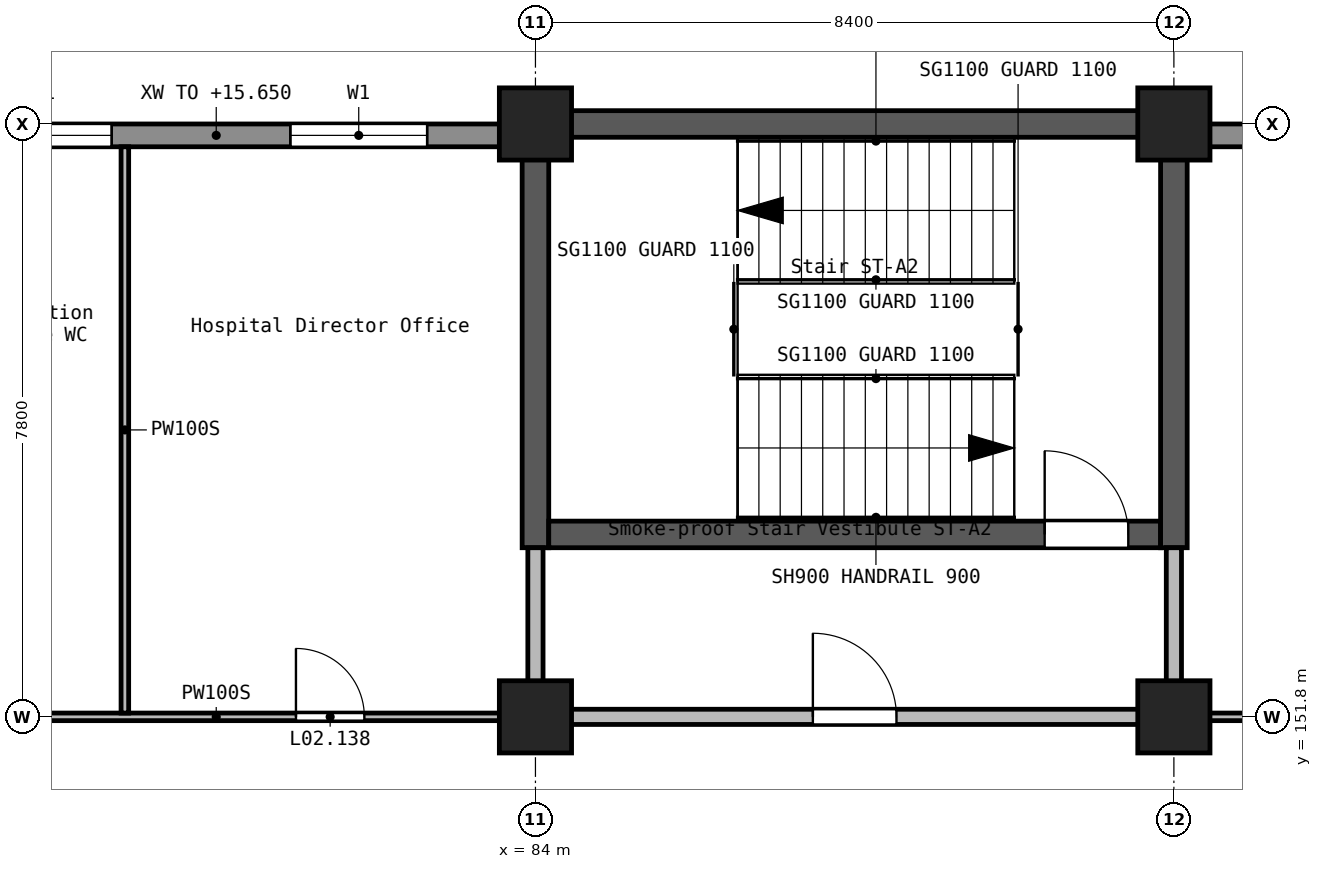
"""IFC4 building model, lengths in metres.
Left out: names, types, materials, properties, quantities, classifications, styles, units other than length and angle.
Written with IfcOpenShell. Run it as: python <this file> out.ifc"""

import sys

from ifc_helpers import new_model, si_unit, direction, frame, frame_2d, origin, origin_2d, place, context, subcontext, project, spatial, rectangle, extrude, element, fill, save


model = new_model("IFC4")
c1 = context("Model", 3, precision=1e-05, world=origin(), true_north=direction((0.0, 1.0)))
c2 = subcontext(c1, "Body", "Model", "MODEL_VIEW")
j1 = project(units=[si_unit("LENGTHUNIT", "METRE"), si_unit("PLANEANGLEUNIT", "RADIAN")], contexts=[c1])
p1 = place(None, origin())
s1 = spatial("IfcSite", under=j1, at=p1, CompositionType="ELEMENT")
p2 = place(p1, origin())
s2 = spatial("IfcBuilding", under=s1, at=p2, CompositionType="ELEMENT")
p3 = place(p2, frame((0.0, 0.0, 12.6)))
s3 = spatial("IfcBuildingStorey", under=s2, at=p3, CompositionType="ELEMENT", Elevation=12.6)
for number, where, z_axis, x_axis in (
    (1, (84.0, 151.8, 0.0), (0.0, 0.0, 1.0), (1.0, 0.0, 0.0)),
    (2, (84.0, 159.6, 0.0), (0.0, 0.0, 1.0), (1.0, 0.0, 0.0)),
    (3, (92.4, 151.8, 0.0), (0.0, 0.0, 1.0), (1.0, 0.0, 0.0)),
    (4, (92.4, 159.6, 0.0), (0.0, 0.0, 1.0), (1.0, 0.0, 0.0)),
):
    element("IfcColumn", number, at=place(p3, frame(where, z_axis=z_axis, x_axis=x_axis)), inside=s3, PredefinedType="COLUMN", context=c2, shape_type="SweptSolid", body=[
        extrude(rectangle(XDim=0.95, YDim=0.95, at=origin_2d()), origin(), (0.0, 0.0, 1.0), 4.2),
    ])
p4 = place(p3, frame((83.825, 159.6, 0.0), z_axis=(0.0, 0.0, 1.0), x_axis=(1.0, 0.0, 0.0)))
e5 = element("IfcWall", 5, at=p4, inside=s3, PredefinedType="SHEAR", context=c2, shape_type="SweptSolid", body=[
    extrude(rectangle(XDim=8.4, YDim=0.35, at=frame_2d((4.2, 0.0))), origin(), (0.0, 0.0, 1.0), 4.2),
])
p5 = place(p3, frame((84.0, 154.025, 0.0), z_axis=(0.0, 0.0, 1.0), x_axis=(0.0, 1.0, 0.0)))
e6 = element("IfcWall", 6, at=p5, inside=s3, PredefinedType="SHEAR", context=c2, shape_type="SweptSolid", body=[
    extrude(rectangle(XDim=5.4, YDim=0.35, at=frame_2d((2.7, 0.0))), origin(), (0.0, 0.0, 1.0), 4.2),
])
p6 = place(p3, frame((84.175, 154.2, 0.0), z_axis=(0.0, 0.0, 1.0), x_axis=(1.0, 0.0, 0.0)))
e7 = element("IfcWall", 7, at=p6, inside=s3, PredefinedType="SHEAR", context=c2, shape_type="SweptSolid", body=[
    extrude(rectangle(XDim=8.05, YDim=0.35, at=frame_2d((4.025, 0.0))), origin(), (0.0, 0.0, 1.0), 4.2),
])
p7 = place(p6, frame((6.525, 0.0, 0.0)))
e8 = element("IfcOpeningElement", 8, at=p7, cuts=e7, PredefinedType="OPENING", context=c2, shape_type="SweptSolid", body=[
    extrude(rectangle(XDim=1.1, YDim=2.1, at=frame_2d((0.55, 1.05))), frame((0.0, 0.185, 0.0), z_axis=(0.0, -1.0, 0.0), x_axis=(1.0, 0.0, 0.0)), (0.0, 0.0, 1.0), 0.37),
])
p8 = place(p3, frame((92.4, 154.025, 0.0), z_axis=(0.0, 0.0, 1.0), x_axis=(0.0, 1.0, 0.0)))
e9 = element("IfcWall", 9, at=p8, inside=s3, PredefinedType="SHEAR", context=c2, shape_type="SweptSolid", body=[
    extrude(rectangle(XDim=5.75, YDim=0.35, at=frame_2d((2.875, 0.0))), origin(), (0.0, 0.0, 1.0), 4.2),
])
p9 = place(p3, frame((100.35, 159.45, 0.0), z_axis=(0.0, 0.0, 1.0), x_axis=(-1.0, 0.0, 0.0)))
e10 = element("IfcWall", 10, at=p9, inside=s3, PredefinedType="STANDARD", context=c2, shape_type="SweptSolid", body=[
    extrude(rectangle(XDim=7.5, YDim=0.3, at=frame_2d((3.75, 0.0))), origin(), (0.0, 0.0, 1.0), 3.05),
])
p10 = place(p9, frame((0.575, 0.0, 0.9)))
e11 = element("IfcOpeningElement", 11, at=p10, cuts=e10, PredefinedType="OPENING", context=c2, shape_type="SweptSolid", body=[
    extrude(rectangle(XDim=1.8, YDim=1.5, at=frame_2d((0.9, 0.75))), frame((0.0, 0.16, 0.0), z_axis=(0.0, -1.0, 0.0), x_axis=(1.0, 0.0, 0.0)), (0.0, 0.0, 1.0), 0.32),
])
p11 = place(p9, frame((4.725, 0.0, 0.9)))
e12 = element("IfcOpeningElement", 12, at=p11, cuts=e10, PredefinedType="OPENING", context=c2, shape_type="SweptSolid", body=[
    extrude(rectangle(XDim=1.8, YDim=1.5, at=frame_2d((0.9, 0.75))), frame((0.0, 0.16, 0.0), z_axis=(0.0, -1.0, 0.0), x_axis=(1.0, 0.0, 0.0)), (0.0, 0.0, 1.0), 0.32),
])
p12 = place(p3, frame((83.55, 159.45, 0.0), z_axis=(0.0, 0.0, 1.0), x_axis=(-1.0, 0.0, 0.0)))
e13 = element("IfcWall", 13, at=p12, inside=s3, PredefinedType="STANDARD", context=c2, shape_type="SweptSolid", body=[
    extrude(rectangle(XDim=7.5, YDim=0.3, at=frame_2d((3.75, 0.0))), origin(), (0.0, 0.0, 1.0), 3.05),
])
p13 = place(p12, frame((0.975, 0.0, 0.9)))
e14 = element("IfcOpeningElement", 14, at=p13, cuts=e13, PredefinedType="OPENING", context=c2, shape_type="SweptSolid", body=[
    extrude(rectangle(XDim=1.8, YDim=1.5, at=frame_2d((0.9, 0.75))), frame((0.0, 0.16, 0.0), z_axis=(0.0, -1.0, 0.0), x_axis=(1.0, 0.0, 0.0)), (0.0, 0.0, 1.0), 0.32),
])
p14 = place(p12, frame((5.125, 0.0, 0.9)))
e15 = element("IfcOpeningElement", 15, at=p14, cuts=e13, PredefinedType="OPENING", context=c2, shape_type="SweptSolid", body=[
    extrude(rectangle(XDim=1.8, YDim=1.5, at=frame_2d((0.9, 0.75))), frame((0.0, 0.16, 0.0), z_axis=(0.0, -1.0, 0.0), x_axis=(1.0, 0.0, 0.0)), (0.0, 0.0, 1.0), 0.32),
])
p15 = place(p3, frame((84.45, 151.8, 0.0), z_axis=(0.0, 0.0, 1.0), x_axis=(1.0, 0.0, 0.0)))
e16 = element("IfcWall", 16, at=p15, inside=s3, PredefinedType="SOLIDWALL", context=c2, shape_type="SweptSolid", body=[
    extrude(rectangle(XDim=7.5, YDim=0.2, at=frame_2d((3.75, 0.0))), origin(), (0.0, 0.0, 1.0), 3.85),
])
p16 = place(p15, frame((3.2, 0.0, 0.0)))
e17 = element("IfcOpeningElement", 17, at=p16, cuts=e16, PredefinedType="OPENING", context=c2, shape_type="SweptSolid", body=[
    extrude(rectangle(XDim=1.1, YDim=2.1, at=frame_2d((0.55, 1.05))), frame((0.0, 0.11, 0.0), z_axis=(0.0, -1.0, 0.0), x_axis=(1.0, 0.0, 0.0)), (0.0, 0.0, 1.0), 0.22),
])
for number, where, z_axis, x_axis in (
    (18, (84.0, 152.25, 0.0), (0.0, 0.0, 1.0), (0.0, 1.0, 0.0)),
    (19, (92.4, 152.25, 0.0), (0.0, 0.0, 1.0), (0.0, 1.0, 0.0)),
):
    element("IfcWall", number, at=place(p3, frame(where, z_axis=z_axis, x_axis=x_axis)), inside=s3, PredefinedType="SOLIDWALL", context=c2, shape_type="SweptSolid", body=[
        extrude(rectangle(XDim=1.775, YDim=0.2, at=frame_2d((0.887, 0.0))), origin(), (0.0, 0.0, 1.0), 3.85),
    ])
p17 = place(p3, frame((76.05, 151.8, 0.0), z_axis=(0.0, 0.0, 1.0), x_axis=(1.0, 0.0, 0.0)))
e20 = element("IfcWall", 20, at=p17, inside=s3, PredefinedType="PARTITIONING", context=c2, shape_type="SweptSolid", body=[
    extrude(rectangle(XDim=7.5, YDim=0.1, at=frame_2d((3.75, 0.0))), origin(), (0.0, 0.0, 1.0), 3.85),
])
p18 = place(p17, frame((0.549, 0.0, 0.0)))
e21 = element("IfcOpeningElement", 21, at=p18, cuts=e20, PredefinedType="OPENING", context=c2, shape_type="SweptSolid", body=[
    extrude(rectangle(XDim=1.0, YDim=2.1, at=frame_2d((0.5, 1.05))), frame((0.0, 0.06, 0.0), z_axis=(0.0, -1.0, 0.0), x_axis=(1.0, 0.0, 0.0)), (0.0, 0.0, 1.0), 0.12),
])
p19 = place(p17, frame((4.799, 0.0, 0.0)))
e22 = element("IfcOpeningElement", 22, at=p19, cuts=e20, PredefinedType="OPENING", context=c2, shape_type="SweptSolid", body=[
    extrude(rectangle(XDim=0.9, YDim=2.1, at=frame_2d((0.45, 1.05))), frame((0.0, 0.06, 0.0), z_axis=(0.0, -1.0, 0.0), x_axis=(1.0, 0.0, 0.0)), (0.0, 0.0, 1.0), 0.12),
])
p20 = place(p3, frame((92.85, 151.8, 0.0), z_axis=(0.0, 0.0, 1.0), x_axis=(1.0, 0.0, 0.0)))
e23 = element("IfcWall", 23, at=p20, inside=s3, PredefinedType="PARTITIONING", context=c2, shape_type="SweptSolid", body=[
    extrude(rectangle(XDim=7.5, YDim=0.1, at=frame_2d((3.75, 0.0))), origin(), (0.0, 0.0, 1.0), 3.85),
])
p21 = place(p20, frame((1.349, 0.0, 0.0)))
e24 = element("IfcOpeningElement", 24, at=p21, cuts=e23, PredefinedType="OPENING", context=c2, shape_type="SweptSolid", body=[
    extrude(rectangle(XDim=1.8, YDim=2.1, at=frame_2d((0.9, 1.05))), frame((0.0, 0.06, 0.0), z_axis=(0.0, -1.0, 0.0), x_axis=(1.0, 0.0, 0.0)), (0.0, 0.0, 1.0), 0.12),
])
p22 = place(p20, frame((5.999, 0.0, 0.0)))
e25 = element("IfcOpeningElement", 25, at=p22, cuts=e23, PredefinedType="OPENING", context=c2, shape_type="SweptSolid", body=[
    extrude(rectangle(XDim=0.9, YDim=2.1, at=frame_2d((0.45, 1.05))), frame((0.0, 0.06, 0.0), z_axis=(0.0, -1.0, 0.0), x_axis=(1.0, 0.0, 0.0)), (0.0, 0.0, 1.0), 0.12),
])
p23 = place(p3, frame((78.598, 151.85, 0.0), z_axis=(0.0, 0.0, 1.0), x_axis=(0.0, 1.0, 0.0)))
e26 = element("IfcWall", 26, at=p23, inside=s3, PredefinedType="PARTITIONING", context=c2, shape_type="SweptSolid", body=[
    extrude(rectangle(XDim=7.45, YDim=0.1, at=frame_2d((3.725, 0.0))), origin(), (0.0, 0.0, 1.0), 3.85),
])
p24 = place(p13, origin())
e27 = element("IfcWindow", 27, at=p24, inside=s3, PartitioningType="SINGLE_PANEL", PredefinedType="WINDOW", context=c2, shape_type="SweptSolid", body=[
    extrude(rectangle(XDim=1.8, YDim=1.5, at=frame_2d((0.9, 0.75))), frame((0.0, 0.03, 0.0), z_axis=(0.0, -1.0, 0.0), x_axis=(1.0, 0.0, 0.0)), (0.0, 0.0, 1.0), 0.06),
])
fill(e14, e27)
p25 = place(p14, origin())
e28 = element("IfcWindow", 28, at=p25, inside=s3, PartitioningType="SINGLE_PANEL", PredefinedType="WINDOW", context=c2, shape_type="SweptSolid", body=[
    extrude(rectangle(XDim=1.8, YDim=1.5, at=frame_2d((0.9, 0.75))), frame((0.0, 0.03, 0.0), z_axis=(0.0, -1.0, 0.0), x_axis=(1.0, 0.0, 0.0)), (0.0, 0.0, 1.0), 0.06),
])
fill(e15, e28)
p26 = place(p7, origin())
e29 = element("IfcDoor", 29, at=p26, inside=s3, OperationType="SINGLE_SWING_RIGHT", PredefinedType="DOOR", context=c2, shape_type="SweptSolid", body=[
    extrude(rectangle(XDim=1.1, YDim=2.1, at=frame_2d((0.55, 1.05))), frame((0.0, 0.025, 0.0), z_axis=(0.0, -1.0, 0.0), x_axis=(1.0, 0.0, 0.0)), (0.0, 0.0, 1.0), 0.05),
])
fill(e8, e29)
p27 = place(p16, origin())
e30 = element("IfcDoor", 30, at=p27, inside=s3, OperationType="SINGLE_SWING_RIGHT", PredefinedType="DOOR", context=c2, shape_type="SweptSolid", body=[
    extrude(rectangle(XDim=1.1, YDim=2.1, at=frame_2d((0.55, 1.05))), frame((0.0, 0.025, 0.0), z_axis=(0.0, -1.0, 0.0), x_axis=(1.0, 0.0, 0.0)), (0.0, 0.0, 1.0), 0.05),
])
fill(e17, e30)
p28 = place(p19, origin())
e31 = element("IfcDoor", 31, at=p28, inside=s3, OperationType="SINGLE_SWING_RIGHT", PredefinedType="DOOR", context=c2, shape_type="SweptSolid", body=[
    extrude(rectangle(XDim=0.9, YDim=2.1, at=frame_2d((0.45, 1.05))), frame((0.0, 0.025, 0.0), z_axis=(0.0, -1.0, 0.0), x_axis=(1.0, 0.0, 0.0)), (0.0, 0.0, 1.0), 0.05),
])
fill(e22, e31)
save(model, sys.argv[1])
